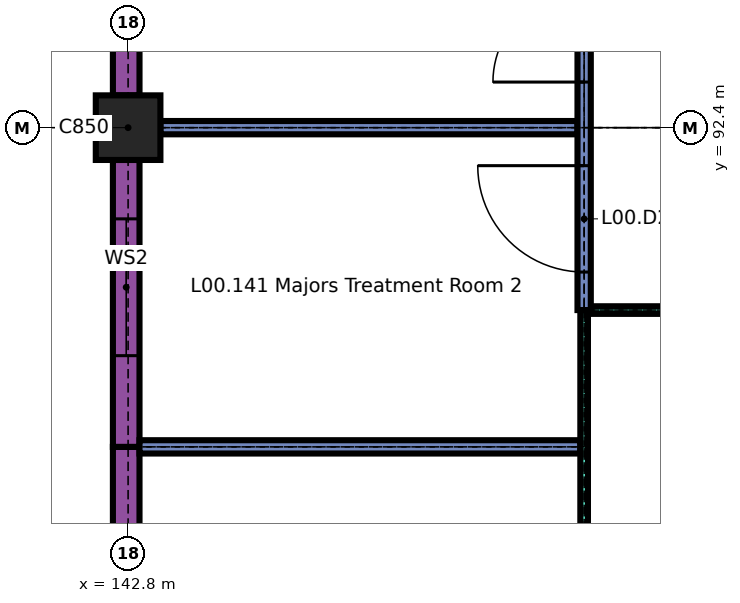
"""IFC4 building model, lengths in metres.
Left out: names, types, materials, properties, quantities, classifications, styles, units other than length and angle.
Written with IfcOpenShell. Run it as: python <this file> out.ifc"""

import sys

from ifc_helpers import new_model, si_unit, direction, frame, frame_2d, origin, origin_2d, place, context, subcontext, project, spatial, rectangle, extrude, element, fill, save


model = new_model("IFC4")
c1 = context("Model", 3, precision=1e-05, world=origin(), true_north=direction((0.0, 1.0)))
c2 = subcontext(c1, "Body", "Model", "MODEL_VIEW")
j1 = project(units=[si_unit("LENGTHUNIT", "METRE"), si_unit("PLANEANGLEUNIT", "RADIAN")], contexts=[c1])
p1 = place(None, origin())
s1 = spatial("IfcSite", under=j1, at=p1, CompositionType="ELEMENT")
p2 = place(p1, origin())
s2 = spatial("IfcBuilding", under=s1, at=p2, CompositionType="ELEMENT")
p3 = place(p2, origin())
s3 = spatial("IfcBuildingStorey", under=s2, at=p3, CompositionType="ELEMENT", Elevation=0.0)
p4 = place(p3, frame((142.8, 92.4, 0.0), z_axis=(0.0, 0.0, 1.0), x_axis=(1.0, 0.0, 0.0)))
e1 = element("IfcColumn", 1, at=p4, inside=s3, PredefinedType="COLUMN", context=c2, shape_type="SweptSolid", body=[
    extrude(rectangle(XDim=0.85, YDim=0.85, at=origin_2d()), origin(), (0.0, 0.0, 1.0), 4.14),
])
p5 = place(p3, frame((142.775, 84.0, 0.0), z_axis=(0.0, 0.0, 1.0), x_axis=(0.0, 1.0, 0.0)))
e2 = element("IfcWall", 2, at=p5, inside=s3, PredefinedType="SOLIDWALL", context=c2, shape_type="SweptSolid", body=[
    extrude(rectangle(XDim=4.2, YDim=0.35, at=frame_2d((2.1, 0.0))), origin(), (0.0, 0.0, 1.0), 3.84),
])
p6 = place(p5, frame((1.2, 0.0, 0.9)))
e3 = element("IfcOpeningElement", 3, at=p6, cuts=e2, PredefinedType="OPENING", context=c2, shape_type="SweptSolid", body=[
    extrude(rectangle(XDim=1.8, YDim=2.1, at=frame_2d((0.9, 1.05))), frame((0.0, 0.185, 0.0), z_axis=(0.0, -1.0, 0.0), x_axis=(1.0, 0.0, 0.0)), (0.0, 0.0, 1.0), 0.37),
])
p7 = place(p3, frame((142.775, 88.2, 0.0), z_axis=(0.0, 0.0, 1.0), x_axis=(0.0, 1.0, 0.0)))
e4 = element("IfcWall", 4, at=p7, inside=s3, PredefinedType="SOLIDWALL", context=c2, shape_type="SweptSolid", body=[
    extrude(rectangle(XDim=3.775, YDim=0.35, at=frame_2d((1.888, 0.0))), origin(), (0.0, 0.0, 1.0), 3.84),
])
p8 = place(p7, frame((1.2, 0.0, 0.9)))
e5 = element("IfcOpeningElement", 5, at=p8, cuts=e4, PredefinedType="OPENING", context=c2, shape_type="SweptSolid", body=[
    extrude(rectangle(XDim=1.8, YDim=2.1, at=frame_2d((0.9, 1.05))), frame((0.0, 0.185, 0.0), z_axis=(0.0, -1.0, 0.0), x_axis=(1.0, 0.0, 0.0)), (0.0, 0.0, 1.0), 0.37),
])
p9 = place(p3, frame((142.775, 92.825, 0.0), z_axis=(0.0, 0.0, 1.0), x_axis=(0.0, 1.0, 0.0)))
e6 = element("IfcWall", 6, at=p9, inside=s3, PredefinedType="SOLIDWALL", context=c2, shape_type="SweptSolid", body=[
    extrude(rectangle(XDim=3.775, YDim=0.35, at=frame_2d((1.888, 0.0))), origin(), (0.0, 0.0, 1.0), 3.84),
])
p10 = place(p9, frame((0.925, 0.0, 0.9)))
e7 = element("IfcOpeningElement", 7, at=p10, cuts=e6, PredefinedType="OPENING", context=c2, shape_type="SweptSolid", body=[
    extrude(rectangle(XDim=1.5, YDim=2.1, at=frame_2d((0.75, 1.05))), frame((0.0, 0.185, 0.0), z_axis=(0.0, -1.0, 0.0), x_axis=(1.0, 0.0, 0.0)), (0.0, 0.0, 1.0), 0.37),
])
p11 = place(p3, frame((142.95, 88.2, 0.0), z_axis=(0.0, 0.0, 1.0), x_axis=(1.0, 0.0, 0.0)))
e8 = element("IfcWall", 8, at=p11, inside=s3, PredefinedType="PARTITIONING", context=c2, shape_type="SweptSolid", body=[
    extrude(rectangle(XDim=5.8, YDim=0.175, at=frame_2d((2.9, 0.0))), origin(), (0.0, 0.0, 1.0), 4.14),
])
p12 = place(p3, frame((148.887, 90.0, 0.0), z_axis=(0.0, 0.0, 1.0), x_axis=(1.0, 0.0, 0.0)))
e9 = element("IfcWall", 9, at=p12, inside=s3, PredefinedType="PARTITIONING", context=c2, shape_type="SweptSolid", body=[
    extrude(rectangle(XDim=2.363, YDim=0.1, at=frame_2d((1.181, 0.0))), origin(), (0.0, 0.0, 1.0), 4.14),
])
p13 = place(p3, frame((143.225, 92.4, 0.0), z_axis=(0.0, 0.0, 1.0), x_axis=(1.0, 0.0, 0.0)))
e10 = element("IfcWall", 10, at=p13, inside=s3, PredefinedType="PARTITIONING", context=c2, shape_type="SweptSolid", body=[
    extrude(rectangle(XDim=5.487, YDim=0.175, at=frame_2d((2.744, 0.0))), origin(), (0.0, 0.0, 1.0), 4.14),
])
p14 = place(p3, frame((148.8, 86.4, 0.0), z_axis=(0.0, 0.0, 1.0), x_axis=(0.0, 1.0, 0.0)))
e11 = element("IfcWall", 11, at=p14, inside=s3, PredefinedType="PARTITIONING", context=c2, shape_type="SweptSolid", body=[
    extrude(rectangle(XDim=3.6, YDim=0.1, at=frame_2d((1.8, 0.0))), origin(), (0.0, 0.0, 1.0), 4.14),
])
p15 = place(p3, frame((148.8, 90.0, 0.0), z_axis=(0.0, 0.0, 1.0), x_axis=(0.0, 1.0, 0.0)))
e12 = element("IfcWall", 12, at=p15, inside=s3, PredefinedType="PARTITIONING", context=c2, shape_type="SweptSolid", body=[
    extrude(rectangle(XDim=4.8, YDim=0.175, at=frame_2d((2.4, 0.0))), origin(), (0.0, 0.0, 1.0), 4.14),
])
p16 = place(p15, frame((0.5, 0.0, 0.0)))
e13 = element("IfcOpeningElement", 13, at=p16, cuts=e12, PredefinedType="OPENING", context=c2, shape_type="SweptSolid", body=[
    extrude(rectangle(XDim=1.4, YDim=2.1, at=frame_2d((0.7, 1.05))), frame((0.0, 0.097, 0.0), z_axis=(0.0, -1.0, 0.0), x_axis=(1.0, 0.0, 0.0)), (0.0, 0.0, 1.0), 0.195),
])
p17 = place(p15, frame((3.0, 0.0, 0.0)))
e14 = element("IfcOpeningElement", 14, at=p17, cuts=e12, PredefinedType="OPENING", context=c2, shape_type="SweptSolid", body=[
    extrude(rectangle(XDim=1.2, YDim=2.1, at=frame_2d((0.6, 1.05))), frame((0.0, 0.097, 0.0), z_axis=(0.0, -1.0, 0.0), x_axis=(1.0, 0.0, 0.0)), (0.0, 0.0, 1.0), 0.195),
])
p18 = place(p8, origin())
e15 = element("IfcWindow", 15, at=p18, inside=s3, PartitioningType="SINGLE_PANEL", PredefinedType="WINDOW", context=c2, shape_type="SweptSolid", body=[
    extrude(rectangle(XDim=1.8, YDim=2.1, at=frame_2d((0.9, 1.05))), frame((0.0, 0.045, 0.0), z_axis=(0.0, -1.0, 0.0), x_axis=(1.0, 0.0, 0.0)), (0.0, 0.0, 1.0), 0.09),
])
fill(e5, e15)
p19 = place(p16, origin())
e16 = element("IfcDoor", 16, at=p19, inside=s3, OperationType="SINGLE_SWING_LEFT", PredefinedType="DOOR", context=c2, shape_type="SweptSolid", body=[
    extrude(rectangle(XDim=1.4, YDim=2.1, at=frame_2d((0.7, 1.05))), frame((0.0, 0.025, 0.0), z_axis=(0.0, -1.0, 0.0), x_axis=(1.0, 0.0, 0.0)), (0.0, 0.0, 1.0), 0.05),
])
fill(e13, e16)
p20 = place(p17, origin())
e17 = element("IfcDoor", 17, at=p20, inside=s3, OperationType="SINGLE_SWING_RIGHT", PredefinedType="DOOR", context=c2, shape_type="SweptSolid", body=[
    extrude(rectangle(XDim=1.2, YDim=2.1, at=frame_2d((0.6, 1.05))), frame((0.0, 0.035, 0.0), z_axis=(0.0, -1.0, 0.0), x_axis=(1.0, 0.0, 0.0)), (0.0, 0.0, 1.0), 0.07),
])
fill(e14, e17)
save(model, sys.argv[1])
